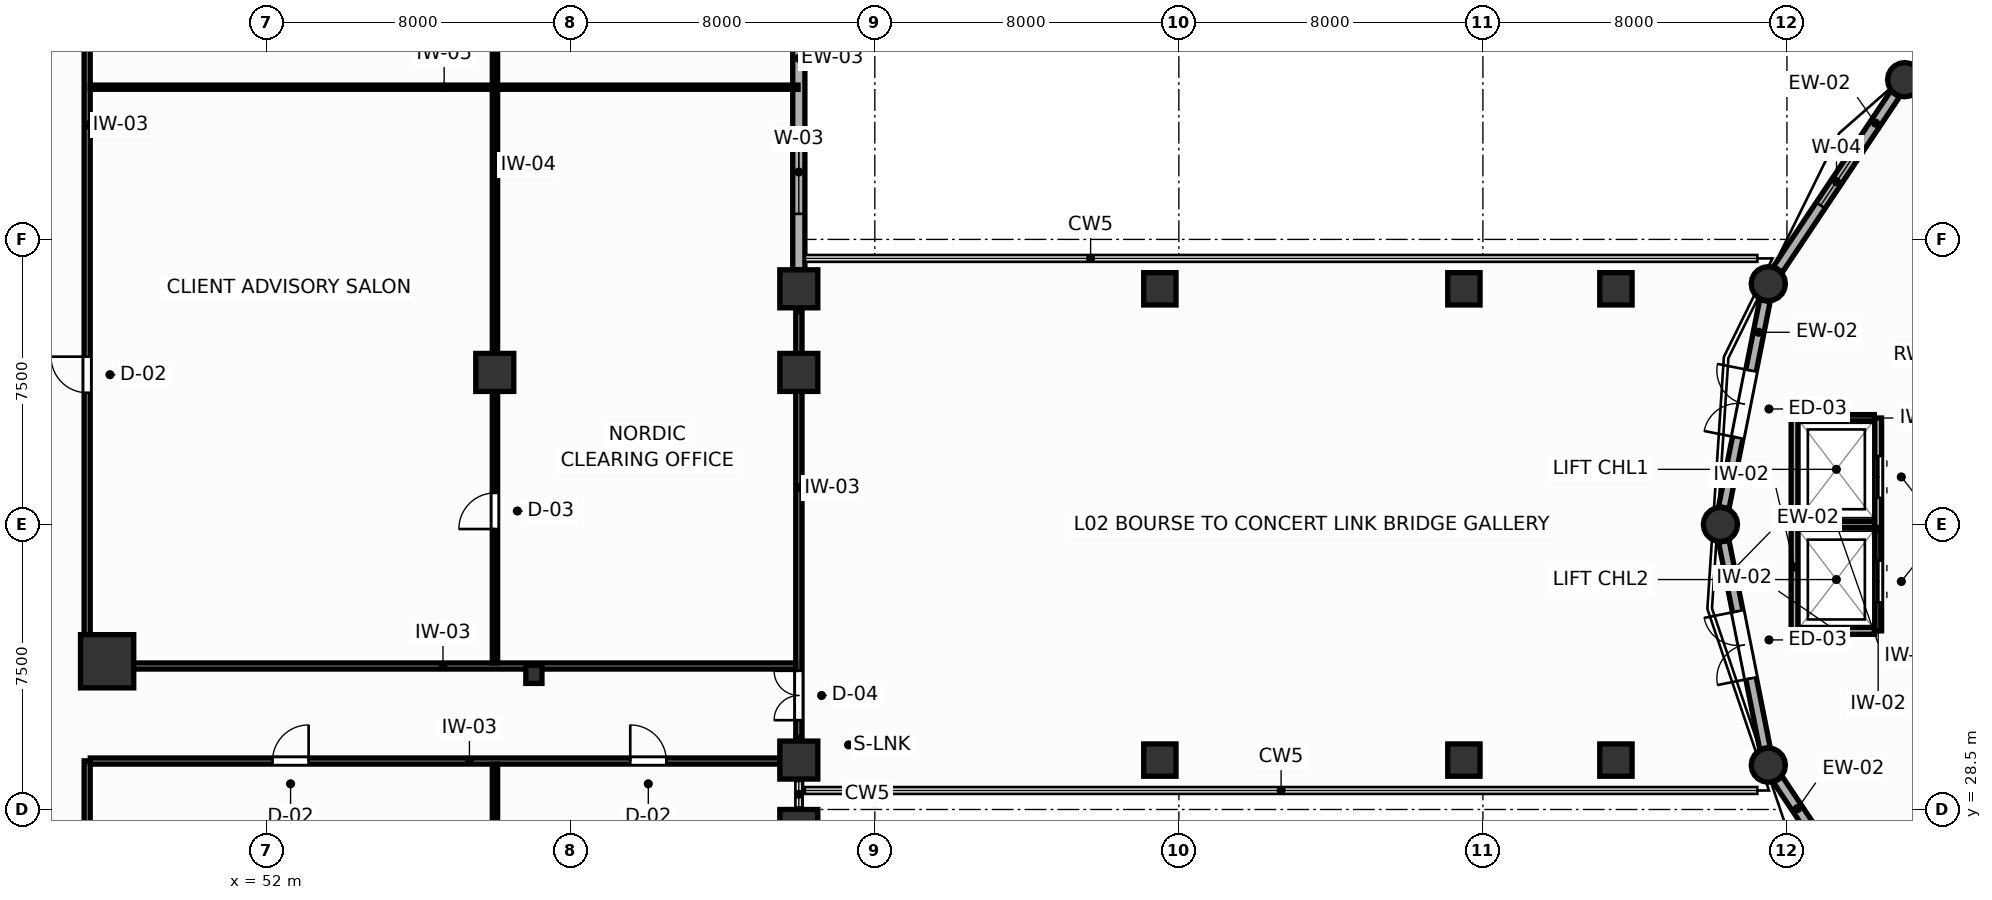
"""IFC4 building model, lengths in metres.
Left out: names, types, materials, properties, quantities, classifications, styles, units other than length and angle.
Written with IfcOpenShell. Run it as: python <this file> out.ifc"""

import sys

from ifc_helpers import new_model, si_unit, direction, frame, frame_2d, origin, origin_2d, place, context, subcontext, project, spatial, rectangle, circle, i_section, extrude, source, transform, mapped, element, fill, save


model = new_model("IFC4")
c1 = context("Model", 3, precision=1e-05, world=origin(), true_north=direction((0.0, 1.0)))
c2 = subcontext(c1, "Body", "Model", "MODEL_VIEW")
j1 = project(units=[si_unit("LENGTHUNIT", "METRE"), si_unit("PLANEANGLEUNIT", "RADIAN")], contexts=[c1])
p1 = place(None, origin())
s1 = spatial("IfcSite", under=j1, at=p1, CompositionType="ELEMENT")
p2 = place(p1, origin())
s2 = spatial("IfcBuilding", under=s1, at=p2, CompositionType="ELEMENT")
p3 = place(p2, frame((0.0, 0.0, 9.6)))
s3 = spatial("IfcBuildingStorey", under=s2, at=p3, CompositionType="ELEMENT", Elevation=9.6)
m1 = source(origin(), c2, "Body", "SweptSolid", [
    extrude(rectangle(XDim=1.4, YDim=1.4, at=origin_2d()), origin(), (0.0, 0.0, 1.0), 4.8),
])
p4 = place(p3, frame((47.8, 32.4, 0.0), z_axis=(0.0, 0.0, 1.0), x_axis=(1.0, 0.0, 0.0)))
e1 = element("IfcColumn", 1, at=p4, inside=s3, PredefinedType="COLUMN", context=c2, shape_type="MappedRepresentation", body=[
    mapped(m1, transform((0.0, 0.0, 0.0), scale=1.0)),
])
m2 = source(origin(), c2, "Body", "SweptSolid", [
    extrude(rectangle(XDim=1.0, YDim=1.0, at=origin_2d()), origin(), (0.0, 0.0, 1.0), 4.8),
])
for number, where, z_axis, x_axis in (
    (2, (66.0, 28.0, 0.0), (0.0, 0.0, 1.0), (1.0, 0.0, 0.0)),
    (3, (66.0, 40.0, 0.0), (0.0, 0.0, 1.0), (1.0, 0.0, 0.0)),
    (4, (58.0, 40.0, 0.0), (0.0, 0.0, 1.0), (1.0, 0.0, 0.0)),
    (5, (66.0, 29.8, 0.0), (0.0, 0.0, 1.0), (1.0, 0.0, 0.0)),
    (6, (66.0, 42.2, 0.0), (0.0, 0.0, 1.0), (1.0, 0.0, 0.0)),
):
    element("IfcColumn", number, at=place(p3, frame(where, z_axis=z_axis, x_axis=x_axis)), inside=s3, PredefinedType="COLUMN", context=c2, shape_type="MappedRepresentation", body=[
        mapped(m2, transform((0.0, 0.0, 0.0), scale=1.0)),
    ])
m3 = source(origin(), c2, "Body", "SweptSolid", [
    extrude(i_section(OverallWidth=0.424, OverallDepth=0.474, WebThickness=0.045, FlangeThickness=0.072, FilletRadius=0.015, at=origin_2d()), origin(), (0.0, 0.0, 1.0), 4.8),
])
p5 = place(p3, frame((59.03, 32.054, 0.0), z_axis=(0.0, 0.0, 1.0), x_axis=(1.0, 0.0, 0.0)))
e7 = element("IfcColumn", 7, at=p5, inside=s3, PredefinedType="COLUMN", context=c2, shape_type="MappedRepresentation", body=[
    mapped(m3, transform((0.0, 0.0, 0.0), scale=1.0)),
])
m4 = source(origin(), c2, "Body", "SweptSolid", [
    extrude(rectangle(XDim=0.85, YDim=0.85, at=origin_2d()), origin(), (0.0, 0.0, 1.0), 4.8),
])
for number, where, z_axis, x_axis in (
    (8, (75.5, 29.8, 0.0), (0.0, 0.0, 1.0), (1.0, 0.0, 0.0)),
    (9, (75.5, 42.2, 0.0), (0.0, 0.0, 1.0), (1.0, 0.0, 0.0)),
    (10, (83.5, 29.8, 0.0), (0.0, 0.0, 1.0), (1.0, 0.0, 0.0)),
    (11, (83.5, 42.2, 0.0), (0.0, 0.0, 1.0), (1.0, 0.0, 0.0)),
    (12, (87.5, 29.8, 0.0), (0.0, 0.0, 1.0), (1.0, 0.0, 0.0)),
    (13, (87.5, 42.2, 0.0), (0.0, 0.0, 1.0), (1.0, 0.0, 0.0)),
):
    element("IfcColumn", number, at=place(p3, frame(where, z_axis=z_axis, x_axis=x_axis)), inside=s3, PredefinedType="COLUMN", context=c2, shape_type="MappedRepresentation", body=[
        mapped(m4, transform((0.0, 0.0, 0.0), scale=1.0)),
    ])
m5 = source(origin(), c2, "Body", "SweptSolid", [
    extrude(circle(Radius=0.45, at=origin_2d()), origin(), (0.0, 0.0, 1.0), 4.8),
])
for number, where, z_axis, x_axis in (
    (14, (95.097, 47.703, 0.0), (0.0, 0.0, 1.0), (1.0, 0.0, 0.0)),
    (15, (91.51, 42.333, 0.0), (0.0, 0.0, 1.0), (1.0, 0.0, 0.0)),
    (16, (90.25, 36.0, 0.0), (0.0, 0.0, 1.0), (1.0, 0.0, 0.0)),
    (17, (91.51, 29.667, 0.0), (0.0, 0.0, 1.0), (1.0, 0.0, 0.0)),
):
    element("IfcColumn", number, at=place(p3, frame(where, z_axis=z_axis, x_axis=x_axis)), inside=s3, PredefinedType="COLUMN", context=c2, shape_type="MappedRepresentation", body=[
        mapped(m5, transform((0.0, 0.0, 0.0), scale=1.0)),
    ])
p6 = place(p3, frame((66.0, 42.705, 0.0), z_axis=(0.0, 0.0, 1.0), x_axis=(0.0, 1.0, 0.0)))
e18 = element("IfcWall", 18, at=p6, inside=s3, PredefinedType="SOLIDWALL", context=c2, shape_type="SweptSolid", body=[
    extrude(rectangle(XDim=7.27, YDim=0.32, at=frame_2d((3.635, 0.0))), origin(), (0.0, 0.0, 1.0), 4.35),
])
p7 = place(p6, frame((1.468, 0.0, 0.75)))
e19 = element("IfcOpeningElement", 19, at=p7, cuts=e18, PredefinedType="OPENING", context=c2, shape_type="SweptSolid", body=[
    extrude(rectangle(XDim=2.2, YDim=2.0, at=frame_2d((1.1, 1.0))), frame((0.0, 0.17, 0.0), z_axis=(0.0, -1.0, 0.0), x_axis=(1.0, 0.0, 0.0)), (0.0, 0.0, 1.0), 0.34),
])
p8 = place(p3, frame((94.844, 47.324, 0.0), z_axis=(0.0, 0.0, 1.0), x_axis=(-0.555542879373, -0.831487888774, 0.0)))
e20 = element("IfcWall", 20, at=p8, inside=s3, PredefinedType="SOLIDWALL", context=c2, shape_type="SweptSolid", body=[
    extrude(rectangle(XDim=5.547, YDim=0.28, at=frame_2d((2.774, 0.0))), origin(), (0.0, 0.0, 1.0), 3.95),
])
p9 = place(p8, frame((2.024, 0.0, 0.75)))
e21 = element("IfcOpeningElement", 21, at=p9, cuts=e20, PredefinedType="OPENING", context=c2, shape_type="SweptSolid", body=[
    extrude(rectangle(XDim=1.5, YDim=1.85, at=frame_2d((0.75, 0.925))), frame((0.0, 0.15, 0.0), z_axis=(0.0, -1.0, 0.0), x_axis=(1.0, 0.0, 0.0)), (0.0, 0.0, 1.0), 0.3),
])
p10 = place(p3, frame((91.421, 41.887, 0.0), z_axis=(0.0, 0.0, 1.0), x_axis=(-0.19504963768, -0.980793372144, 0.0)))
e22 = element("IfcWall", 22, at=p10, inside=s3, PredefinedType="SOLIDWALL", context=c2, shape_type="SweptSolid", body=[
    extrude(rectangle(XDim=5.547, YDim=0.28, at=frame_2d((2.774, 0.0))), origin(), (0.0, 0.0, 1.0), 3.95),
])
p11 = place(p10, frame((1.874, 0.0, 0.0)))
e23 = element("IfcOpeningElement", 23, at=p11, cuts=e22, PredefinedType="OPENING", context=c2, shape_type="SweptSolid", body=[
    extrude(rectangle(XDim=1.8, YDim=2.2, at=frame_2d((0.9, 1.1))), frame((0.0, 0.15, 0.0), z_axis=(0.0, -1.0, 0.0), x_axis=(1.0, 0.0, 0.0)), (0.0, 0.0, 1.0), 0.3),
])
p12 = place(p3, frame((90.339, 35.554, 0.0), z_axis=(0.0, 0.0, 1.0), x_axis=(0.19504963768, -0.980793372144, 0.0)))
e24 = element("IfcWall", 24, at=p12, inside=s3, PredefinedType="SOLIDWALL", context=c2, shape_type="SweptSolid", body=[
    extrude(rectangle(XDim=5.547, YDim=0.28, at=frame_2d((2.774, 0.0))), origin(), (0.0, 0.0, 1.0), 3.95),
])
p13 = place(p12, frame((1.874, 0.0, 0.0)))
e25 = element("IfcOpeningElement", 25, at=p13, cuts=e24, PredefinedType="OPENING", context=c2, shape_type="SweptSolid", body=[
    extrude(rectangle(XDim=1.8, YDim=2.2, at=frame_2d((0.9, 1.1))), frame((0.0, 0.15, 0.0), z_axis=(0.0, -1.0, 0.0), x_axis=(1.0, 0.0, 0.0)), (0.0, 0.0, 1.0), 0.3),
])
p14 = place(p3, frame((91.763, 29.288, 0.0), z_axis=(0.0, 0.0, 1.0), x_axis=(0.555542879373, -0.831487888774, 0.0)))
e26 = element("IfcWall", 26, at=p14, inside=s3, PredefinedType="SOLIDWALL", context=c2, shape_type="SweptSolid", body=[
    extrude(rectangle(XDim=5.547, YDim=0.28, at=frame_2d((2.774, 0.0))), origin(), (0.0, 0.0, 1.0), 3.95),
])
p15 = place(p14, frame((2.024, 0.0, 0.75)))
e27 = element("IfcOpeningElement", 27, at=p15, cuts=e26, PredefinedType="OPENING", context=c2, shape_type="SweptSolid", body=[
    extrude(rectangle(XDim=1.5, YDim=1.85, at=frame_2d((0.75, 0.925))), frame((0.0, 0.15, 0.0), z_axis=(0.0, -1.0, 0.0), x_axis=(1.0, 0.0, 0.0)), (0.0, 0.0, 1.0), 0.3),
])
p16 = place(p3, frame((94.4, 33.2, 0.0), z_axis=(0.0, 0.0, 1.0), x_axis=(0.0, 1.0, 0.0)))
e28 = element("IfcWall", 28, at=p16, inside=s3, PredefinedType="PARTITIONING", context=c2, shape_type="SweptSolid", body=[
    extrude(rectangle(XDim=5.6, YDim=0.18, at=frame_2d((2.8, 0.0))), origin(), (0.0, 0.0, 1.0), 4.35),
])
p17 = place(p16, frame((3.5, 0.0, 0.0)))
e29 = element("IfcOpeningElement", 29, at=p17, cuts=e28, PredefinedType="OPENING", context=c2, shape_type="SweptSolid", body=[
    extrude(rectangle(XDim=1.1, YDim=2.1, at=frame_2d((0.55, 1.05))), frame((0.0, 0.1, 0.0), z_axis=(0.0, -1.0, 0.0), x_axis=(1.0, 0.0, 0.0)), (0.0, 0.0, 1.0), 0.2),
])
p18 = place(p16, frame((0.75, 0.0, 0.0)))
e30 = element("IfcOpeningElement", 30, at=p18, cuts=e28, PredefinedType="OPENING", context=c2, shape_type="SweptSolid", body=[
    extrude(rectangle(XDim=1.1, YDim=2.1, at=frame_2d((0.55, 1.05))), frame((0.0, 0.1, 0.0), z_axis=(0.0, -1.0, 0.0), x_axis=(1.0, 0.0, 0.0)), (0.0, 0.0, 1.0), 0.2),
])
p19 = place(p3, frame((92.2, 33.2, 0.0), z_axis=(0.0, 0.0, 1.0), x_axis=(0.0, 1.0, 0.0)))
e31 = element("IfcWall", 31, at=p19, inside=s3, PredefinedType="PARTITIONING", context=c2, shape_type="SweptSolid", body=[
    extrude(rectangle(XDim=5.6, YDim=0.18, at=frame_2d((2.8, 0.0))), origin(), (0.0, 0.0, 1.0), 4.35),
])
for number, where, z_axis, x_axis in (
    (32, (92.3, 38.8, 0.0), (0.0, 0.0, 1.0), (1.0, 0.0, 0.0)),
    (33, (92.3, 33.2, 0.0), (0.0, 0.0, 1.0), (1.0, 0.0, 0.0)),
):
    element("IfcWall", number, at=place(p3, frame(where, z_axis=z_axis, x_axis=x_axis)), inside=s3, PredefinedType="PARTITIONING", context=c2, shape_type="SweptSolid", body=[
        extrude(rectangle(XDim=2.0, YDim=0.18, at=frame_2d((1.0, 0.0))), origin(), (0.0, 0.0, 1.0), 4.35),
    ])
p20 = place(p3, frame((92.3, 36.0, 0.0), z_axis=(0.0, 0.0, 1.0), x_axis=(1.0, 0.0, 0.0)))
e34 = element("IfcWall", 34, at=p20, inside=s3, PredefinedType="PARTITIONING", context=c2, shape_type="SweptSolid", body=[
    extrude(rectangle(XDim=2.0, YDim=0.16, at=frame_2d((1.0, 0.0))), origin(), (0.0, 0.0, 1.0), 4.35),
])
p21 = place(p3, frame((66.0, 30.4, 0.0), z_axis=(0.0, 0.0, 1.0), x_axis=(0.0, 1.0, 0.0)))
e35 = element("IfcWall", 35, at=p21, inside=s3, PredefinedType="PARTITIONING", context=c2, shape_type="SweptSolid", body=[
    extrude(rectangle(XDim=11.2, YDim=0.16, at=frame_2d((5.6, 0.0))), origin(), (0.0, 0.0, 1.0), 4.35),
])
p22 = place(p21, frame((0.45, 0.0, 0.0)))
e36 = element("IfcOpeningElement", 36, at=p22, cuts=e35, PredefinedType="OPENING", context=c2, shape_type="SweptSolid", body=[
    extrude(rectangle(XDim=1.3, YDim=2.1, at=frame_2d((0.65, 1.05))), frame((0.0, 0.09, 0.0), z_axis=(0.0, -1.0, 0.0), x_axis=(1.0, 0.0, 0.0)), (0.0, 0.0, 1.0), 0.18),
])
p23 = place(p3, frame((47.275, 3.02, 0.0), z_axis=(0.0, 0.0, 1.0), x_axis=(0.0, 1.0, 0.0)))
e37 = element("IfcWall", 37, at=p23, inside=s3, PredefinedType="PARTITIONING", context=c2, shape_type="SweptSolid", body=[
    extrude(rectangle(XDim=26.76, YDim=0.16, at=frame_2d((13.38, 0.0))), origin(), (0.0, 0.0, 1.0), 4.35),
])
p24 = place(p23, frame((10.07, 0.0, 0.0)))
e38 = element("IfcOpeningElement", 38, at=p24, cuts=e37, PredefinedType="OPENING", context=c2, shape_type="SweptSolid", body=[
    extrude(rectangle(XDim=0.95, YDim=2.05, at=frame_2d((0.475, 1.025))), frame((0.0, 0.09, 0.0), z_axis=(0.0, -1.0, 0.0), x_axis=(1.0, 0.0, 0.0)), (0.0, 0.0, 1.0), 0.18),
])
p25 = place(p3, frame((47.275, 32.27, 0.0), z_axis=(0.0, 0.0, 1.0), x_axis=(0.0, 1.0, 0.0)))
e39 = element("IfcWall", 39, at=p25, inside=s3, PredefinedType="PARTITIONING", context=c2, shape_type="SweptSolid", body=[
    extrude(rectangle(XDim=26.71, YDim=0.16, at=frame_2d((13.355, 0.0))), origin(), (0.0, 0.0, 1.0), 4.35),
])
p26 = place(p25, frame((7.195, 0.0, 0.0)))
e40 = element("IfcOpeningElement", 40, at=p26, cuts=e39, PredefinedType="OPENING", context=c2, shape_type="SweptSolid", body=[
    extrude(rectangle(XDim=0.95, YDim=2.05, at=frame_2d((0.475, 1.025))), frame((0.0, 0.09, 0.0), z_axis=(0.0, -1.0, 0.0), x_axis=(1.0, 0.0, 0.0)), (0.0, 0.0, 1.0), 0.18),
])
p27 = place(p25, frame((20.333, 0.0, 0.0)))
e41 = element("IfcOpeningElement", 41, at=p27, cuts=e39, PredefinedType="OPENING", context=c2, shape_type="SweptSolid", body=[
    extrude(rectangle(XDim=0.95, YDim=2.05, at=frame_2d((0.475, 1.025))), frame((0.0, 0.09, 0.0), z_axis=(0.0, -1.0, 0.0), x_axis=(1.0, 0.0, 0.0)), (0.0, 0.0, 1.0), 0.18),
])
p28 = place(p3, frame((47.357, 29.775, 0.0), z_axis=(0.0, 0.0, 1.0), x_axis=(1.0, 0.0, 0.0)))
e42 = element("IfcWall", 42, at=p28, inside=s3, PredefinedType="PARTITIONING", context=c2, shape_type="SweptSolid", body=[
    extrude(rectangle(XDim=18.623, YDim=0.16, at=frame_2d((9.312, 0.0))), origin(), (0.0, 0.0, 1.0), 4.35),
])
p29 = place(p28, frame((4.795, 0.0, 0.0)))
e43 = element("IfcOpeningElement", 43, at=p29, cuts=e42, PredefinedType="OPENING", context=c2, shape_type="SweptSolid", body=[
    extrude(rectangle(XDim=0.95, YDim=2.05, at=frame_2d((0.475, 1.025))), frame((0.0, 0.09, 0.0), z_axis=(0.0, -1.0, 0.0), x_axis=(1.0, 0.0, 0.0)), (0.0, 0.0, 1.0), 0.18),
])
p30 = place(p28, frame((14.208, 0.0, 0.0)))
e44 = element("IfcOpeningElement", 44, at=p30, cuts=e42, PredefinedType="OPENING", context=c2, shape_type="SweptSolid", body=[
    extrude(rectangle(XDim=0.95, YDim=2.05, at=frame_2d((0.475, 1.025))), frame((0.0, 0.09, 0.0), z_axis=(0.0, -1.0, 0.0), x_axis=(1.0, 0.0, 0.0)), (0.0, 0.0, 1.0), 0.18),
])
p31 = place(p3, frame((47.357, 32.275, 0.0), z_axis=(0.0, 0.0, 1.0), x_axis=(1.0, 0.0, 0.0)))
e45 = element("IfcWall", 45, at=p31, inside=s3, PredefinedType="PARTITIONING", context=c2, shape_type="SweptSolid", body=[
    extrude(rectangle(XDim=18.561, YDim=0.16, at=frame_2d((9.281, 0.0))), origin(), (0.0, 0.0, 1.0), 4.35),
])
p32 = place(p3, frame((58.005, 3.02, 0.0), z_axis=(0.0, 0.0, 1.0), x_axis=(0.0, 1.0, 0.0)))
e46 = element("IfcWall", 46, at=p32, inside=s3, PredefinedType="PARTITIONING", context=c2, shape_type="SweptSolid", body=[
    extrude(rectangle(XDim=26.673, YDim=0.14, at=frame_2d((13.336, 0.0))), origin(), (0.0, 0.0, 1.0), 4.35),
])
p33 = place(p32, frame((10.07, 0.0, 0.0)))
e47 = element("IfcOpeningElement", 47, at=p33, cuts=e46, PredefinedType="OPENING", context=c2, shape_type="SweptSolid", body=[
    extrude(rectangle(XDim=0.95, YDim=2.05, at=frame_2d((0.475, 1.025))), frame((0.0, 0.08, 0.0), z_axis=(0.0, -1.0, 0.0), x_axis=(1.0, 0.0, 0.0)), (0.0, 0.0, 1.0), 0.16),
])
p34 = place(p3, frame((58.005, 32.357, 0.0), z_axis=(0.0, 0.0, 1.0), x_axis=(0.0, 1.0, 0.0)))
e48 = element("IfcWall", 48, at=p34, inside=s3, PredefinedType="PARTITIONING", context=c2, shape_type="SweptSolid", body=[
    extrude(rectangle(XDim=26.623, YDim=0.14, at=frame_2d((13.312, 0.0))), origin(), (0.0, 0.0, 1.0), 4.35),
])
p35 = place(p34, frame((3.522, 0.0, 0.0)))
e49 = element("IfcOpeningElement", 49, at=p35, cuts=e48, PredefinedType="OPENING", context=c2, shape_type="SweptSolid", body=[
    extrude(rectangle(XDim=0.95, YDim=2.05, at=frame_2d((0.475, 1.025))), frame((0.0, 0.08, 0.0), z_axis=(0.0, -1.0, 0.0), x_axis=(1.0, 0.0, 0.0)), (0.0, 0.0, 1.0), 0.16),
])
p36 = place(p34, frame((21.736, 0.0, 0.0)))
e50 = element("IfcOpeningElement", 50, at=p36, cuts=e48, PredefinedType="OPENING", context=c2, shape_type="SweptSolid", body=[
    extrude(rectangle(XDim=0.95, YDim=2.05, at=frame_2d((0.475, 1.025))), frame((0.0, 0.08, 0.0), z_axis=(0.0, -1.0, 0.0), x_axis=(1.0, 0.0, 0.0)), (0.0, 0.0, 1.0), 0.16),
])
p37 = place(p3, frame((47.357, 47.505, 0.0), z_axis=(0.0, 0.0, 1.0), x_axis=(1.0, 0.0, 0.0)))
e51 = element("IfcWall", 51, at=p37, inside=s3, PredefinedType="MOVABLE", context=c2, shape_type="SweptSolid", body=[
    extrude(rectangle(XDim=18.623, YDim=0.11, at=frame_2d((9.312, 0.0))), origin(), (0.0, 0.0, 1.0), 4.35),
])
p38 = place(p7, origin())
e52 = element("IfcWindow", 52, at=p38, inside=s3, PartitioningType="SINGLE_PANEL", PredefinedType="WINDOW", context=c2, shape_type="SweptSolid", body=[
    extrude(rectangle(XDim=2.2, YDim=2.0, at=frame_2d((1.1, 1.0))), frame((0.0, 0.03, 0.0), z_axis=(0.0, -1.0, 0.0), x_axis=(1.0, 0.0, 0.0)), (0.0, 0.0, 1.0), 0.06),
])
fill(e19, e52)
p39 = place(p9, origin())
e53 = element("IfcWindow", 53, at=p39, inside=s3, PartitioningType="SINGLE_PANEL", PredefinedType="WINDOW", context=c2, shape_type="SweptSolid", body=[
    extrude(rectangle(XDim=1.5, YDim=1.85, at=frame_2d((0.75, 0.925))), frame((0.0, 0.03, 0.0), z_axis=(0.0, -1.0, 0.0), x_axis=(1.0, 0.0, 0.0)), (0.0, 0.0, 1.0), 0.06),
])
fill(e21, e53)
p40 = place(p11, frame((1.8, 0.0, 0.0), z_axis=(0.0, 0.0, 1.0), x_axis=(-1.0, 0.0, 0.0)))
e54 = element("IfcDoor", 54, at=p40, inside=s3, OperationType="DOUBLE_DOOR_SINGLE_SWING", PredefinedType="DOOR", context=c2, shape_type="SweptSolid", body=[
    extrude(rectangle(XDim=1.8, YDim=2.2, at=frame_2d((0.9, 1.1))), frame((0.0, 0.025, 0.0), z_axis=(0.0, -1.0, 0.0), x_axis=(1.0, 0.0, 0.0)), (0.0, 0.0, 1.0), 0.05),
])
fill(e23, e54)
p41 = place(p13, frame((1.8, 0.0, 0.0), z_axis=(0.0, 0.0, 1.0), x_axis=(-1.0, 0.0, 0.0)))
e55 = element("IfcDoor", 55, at=p41, inside=s3, OperationType="DOUBLE_DOOR_SINGLE_SWING", PredefinedType="DOOR", context=c2, shape_type="SweptSolid", body=[
    extrude(rectangle(XDim=1.8, YDim=2.2, at=frame_2d((0.9, 1.1))), frame((0.0, 0.025, 0.0), z_axis=(0.0, -1.0, 0.0), x_axis=(1.0, 0.0, 0.0)), (0.0, 0.0, 1.0), 0.05),
])
fill(e25, e55)
p42 = place(p17, origin())
e56 = element("IfcDoor", 56, at=p42, inside=s3, OperationType="DOUBLE_DOOR_SLIDING", PredefinedType="DOOR", context=c2, shape_type="SweptSolid", body=[
    extrude(rectangle(XDim=1.1, YDim=2.1, at=frame_2d((0.55, 1.05))), frame((0.0, 0.025, 0.0), z_axis=(0.0, -1.0, 0.0), x_axis=(1.0, 0.0, 0.0)), (0.0, 0.0, 1.0), 0.05),
])
fill(e29, e56)
p43 = place(p18, origin())
e57 = element("IfcDoor", 57, at=p43, inside=s3, OperationType="DOUBLE_DOOR_SLIDING", PredefinedType="DOOR", context=c2, shape_type="SweptSolid", body=[
    extrude(rectangle(XDim=1.1, YDim=2.1, at=frame_2d((0.55, 1.05))), frame((0.0, 0.025, 0.0), z_axis=(0.0, -1.0, 0.0), x_axis=(1.0, 0.0, 0.0)), (0.0, 0.0, 1.0), 0.05),
])
fill(e30, e57)
p44 = place(p22, origin())
e58 = element("IfcDoor", 58, at=p44, inside=s3, OperationType="DOUBLE_DOOR_SINGLE_SWING", PredefinedType="DOOR", context=c2, shape_type="SweptSolid", body=[
    extrude(rectangle(XDim=1.3, YDim=2.1, at=frame_2d((0.65, 1.05))), frame((0.0, 0.025, 0.0), z_axis=(0.0, -1.0, 0.0), x_axis=(1.0, 0.0, 0.0)), (0.0, 0.0, 1.0), 0.05),
])
fill(e36, e58)
p45 = place(p26, origin())
e59 = element("IfcDoor", 59, at=p45, inside=s3, OperationType="SINGLE_SWING_RIGHT", PredefinedType="DOOR", context=c2, shape_type="SweptSolid", body=[
    extrude(rectangle(XDim=0.95, YDim=2.05, at=frame_2d((0.475, 1.025))), frame((0.0, 0.025, 0.0), z_axis=(0.0, -1.0, 0.0), x_axis=(1.0, 0.0, 0.0)), (0.0, 0.0, 1.0), 0.05),
])
fill(e40, e59)
p46 = place(p29, origin())
e60 = element("IfcDoor", 60, at=p46, inside=s3, OperationType="SINGLE_SWING_RIGHT", PredefinedType="DOOR", context=c2, shape_type="SweptSolid", body=[
    extrude(rectangle(XDim=0.95, YDim=2.05, at=frame_2d((0.475, 1.025))), frame((0.0, 0.025, 0.0), z_axis=(0.0, -1.0, 0.0), x_axis=(1.0, 0.0, 0.0)), (0.0, 0.0, 1.0), 0.05),
])
fill(e43, e60)
p47 = place(p30, origin())
e61 = element("IfcDoor", 61, at=p47, inside=s3, OperationType="SINGLE_SWING_LEFT", PredefinedType="DOOR", context=c2, shape_type="SweptSolid", body=[
    extrude(rectangle(XDim=0.95, YDim=2.05, at=frame_2d((0.475, 1.025))), frame((0.0, 0.025, 0.0), z_axis=(0.0, -1.0, 0.0), x_axis=(1.0, 0.0, 0.0)), (0.0, 0.0, 1.0), 0.05),
])
fill(e44, e61)
p48 = place(p35, origin())
e62 = element("IfcDoor", 62, at=p48, inside=s3, OperationType="SINGLE_SWING_LEFT", PredefinedType="DOOR", context=c2, shape_type="SweptSolid", body=[
    extrude(rectangle(XDim=0.95, YDim=2.05, at=frame_2d((0.475, 1.025))), frame((0.0, 0.025, 0.0), z_axis=(0.0, -1.0, 0.0), x_axis=(1.0, 0.0, 0.0)), (0.0, 0.0, 1.0), 0.05),
])
fill(e49, e62)
save(model, sys.argv[1])
